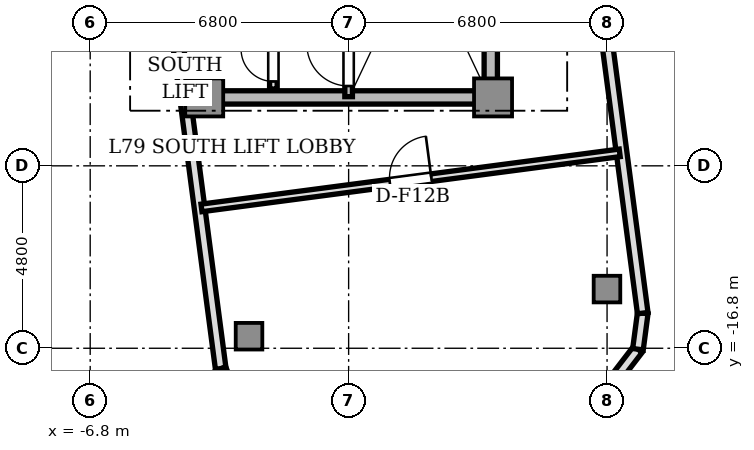
"""IFC4 building model, lengths in metres.
Left out: names, types, materials, properties, quantities, classifications, styles, units other than length and angle.
Written with IfcOpenShell. Run it as: python <this file> out.ifc"""

import sys

from ifc_helpers import new_model, si_unit, direction, frame, frame_2d, origin, origin_2d, place, context, subcontext, project, spatial, rectangle, extrude, source, transform, mapped, element, fill, save


model = new_model("IFC4")
c1 = context("Model", 3, precision=1e-05, world=origin(), true_north=direction((0.0, 1.0)))
c2 = subcontext(c1, "Body", "Model", "MODEL_VIEW")
j1 = project(units=[si_unit("LENGTHUNIT", "METRE"), si_unit("PLANEANGLEUNIT", "RADIAN")], contexts=[c1])
p1 = place(None, origin())
s1 = spatial("IfcSite", under=j1, at=p1, CompositionType="ELEMENT")
p2 = place(p1, origin())
s2 = spatial("IfcBuilding", under=s1, at=p2, CompositionType="ELEMENT")
p3 = place(p2, frame((0.0, 0.0, 285.1)))
s3 = spatial("IfcBuildingStorey", under=s2, at=p3, CompositionType="ELEMENT", Elevation=285.1)
p4 = place(p3, frame((-3.55, -10.2, 0.0), z_axis=(0.0, 0.0, 1.0), x_axis=(1.0, 0.0, 0.0)))
e1 = element("IfcWall", 1, at=p4, inside=s3, PredefinedType="SHEAR", context=c2, shape_type="SweptSolid", body=[
    extrude(rectangle(XDim=7.1, YDim=0.35, at=frame_2d((3.55, 0.0))), origin(), (0.0, 0.0, 1.0), 3.5),
])
p5 = place(p3, frame((3.74, -9.75, 0.0), z_axis=(0.0, 0.0, 1.0), x_axis=(0.0, 1.0, 0.0)))
e2 = element("IfcWall", 2, at=p5, inside=s3, PredefinedType="SHEAR", context=c2, shape_type="SweptSolid", body=[
    extrude(rectangle(XDim=6.9, YDim=0.35, at=frame_2d((3.45, 0.0))), origin(), (0.0, 0.0, 1.0), 3.5),
])
m1 = source(origin(), c2, "Body", "SweptSolid", [
    extrude(rectangle(XDim=1.0, YDim=1.0, at=origin_2d()), origin(), (0.0, 0.0, 1.0), 3.5),
])
for number, where, z_axis, x_axis in (
    (3, (-3.8, -10.2, 0.0), (0.0, 0.0, 1.0), (1.0, 0.0, 0.0)),
    (4, (3.8, -10.2, 0.0), (0.0, 0.0, 1.0), (1.0, 0.0, 0.0)),
):
    element("IfcColumn", number, at=place(p3, frame(where, z_axis=z_axis, x_axis=x_axis)), inside=s3, PredefinedType="COLUMN", context=c2, shape_type="MappedRepresentation", body=[
        mapped(m1, transform((0.0, 0.0, 0.0), scale=1.0)),
    ])
m2 = source(origin(), c2, "Body", "SweptSolid", [
    extrude(rectangle(XDim=0.7, YDim=0.7, at=origin_2d()), origin(), (0.0, 0.0, 1.0), 3.5),
])
for number, where, z_axis, x_axis in (
    (5, (-2.621, -16.483, 0.0), (0.0, 0.0, 1.0), (1.0, 0.0, 0.0)),
    (6, (6.798, -15.243, 0.0), (0.0, 0.0, 1.0), (1.0, 0.0, 0.0)),
):
    element("IfcColumn", number, at=place(p3, frame(where, z_axis=z_axis, x_axis=x_axis)), inside=s3, PredefinedType="COLUMN", context=c2, shape_type="MappedRepresentation", body=[
        mapped(m2, transform((0.0, 0.0, 0.0), scale=1.0)),
    ])
p6 = place(p3, frame((-4.821, -6.283, 0.0), z_axis=(0.0, 0.0, 1.0), x_axis=(0.130521347626, -0.991445499165, 0.0)))
e7 = element("IfcWall", 7, at=p6, inside=s3, PredefinedType="SOLIDWALL", context=c2, shape_type="SweptSolid", body=[
    extrude(rectangle(XDim=11.15, YDim=0.28, at=frame_2d((5.575, 0.0))), origin(), (0.0, 0.0, 1.0), 3.5),
])
p7 = place(p3, frame((-3.366, -17.338, 0.0), z_axis=(0.0, 0.0, 1.0), x_axis=(0.382659506909, -0.923889442397, 0.0)))
e8 = element("IfcWall", 8, at=p7, inside=s3, PredefinedType="SOLIDWALL", context=c2, shape_type="SweptSolid", body=[
    extrude(rectangle(XDim=0.958, YDim=0.28, at=frame_2d((0.479, 0.0))), origin(), (0.0, 0.0, 1.0), 3.5),
])
p8 = place(p3, frame((7.031, -17.585, 0.0), z_axis=(0.0, 0.0, 1.0), x_axis=(0.60861352168, 0.793466811674, 0.0)))
e9 = element("IfcWall", 9, at=p8, inside=s3, PredefinedType="SOLIDWALL", context=c2, shape_type="SweptSolid", body=[
    extrude(rectangle(XDim=0.958, YDim=0.28, at=frame_2d((0.479, 0.0))), origin(), (0.0, 0.0, 1.0), 3.5),
])
p9 = place(p3, frame((7.613, -16.825, 0.0), z_axis=(0.0, 0.0, 1.0), x_axis=(0.130527053476, 0.991444747987, 0.0)))
e10 = element("IfcWall", 10, at=p9, inside=s3, PredefinedType="SOLIDWALL", context=c2, shape_type="SweptSolid", body=[
    extrude(rectangle(XDim=0.958, YDim=0.28, at=frame_2d((0.479, 0.0))), origin(), (0.0, 0.0, 1.0), 3.5),
])
p10 = place(p3, frame((7.738, -15.876, 0.0), z_axis=(0.0, 0.0, 1.0), x_axis=(-0.130521347626, 0.991445499165, 0.0)))
e11 = element("IfcWall", 11, at=p10, inside=s3, PredefinedType="SOLIDWALL", context=c2, shape_type="SweptSolid", body=[
    extrude(rectangle(XDim=11.15, YDim=0.28, at=frame_2d((5.575, 0.0))), origin(), (0.0, 0.0, 1.0), 3.5),
])
p11 = place(p3, frame((0.0, -10.18, 0.0), z_axis=(0.0, 0.0, 1.0), x_axis=(0.0, 1.0, 0.0)))
e12 = element("IfcWall", 12, at=p11, inside=s3, PredefinedType="SOLIDWALL", context=c2, shape_type="SweptSolid", body=[
    extrude(rectangle(XDim=7.68, YDim=0.2, at=frame_2d((3.84, 0.0))), origin(), (0.0, 0.0, 1.0), 3.5),
])
p12 = place(p11, frame((0.28, 0.0, 0.0)))
e13 = element("IfcOpeningElement", 13, at=p12, cuts=e12, PredefinedType="OPENING", context=c2, shape_type="SweptSolid", body=[
    extrude(rectangle(XDim=1.1, YDim=2.15, at=frame_2d((0.55, 1.075))), frame((0.0, 0.11, 0.0), z_axis=(0.0, -1.0, 0.0), x_axis=(1.0, 0.0, 0.0)), (0.0, 0.0, 1.0), 0.22),
])
p13 = place(p3, frame((-1.98, -9.98, 0.0), z_axis=(0.0, 0.0, 1.0), x_axis=(0.0, 1.0, 0.0)))
e14 = element("IfcWall", 14, at=p13, inside=s3, PredefinedType="SOLIDWALL", context=c2, shape_type="SweptSolid", body=[
    extrude(rectangle(XDim=4.66, YDim=0.2, at=frame_2d((2.33, 0.0))), origin(), (0.0, 0.0, 1.0), 3.05),
])
p14 = place(p13, frame((0.2, 0.0, 0.0)))
e15 = element("IfcOpeningElement", 15, at=p14, cuts=e14, PredefinedType="OPENING", context=c2, shape_type="SweptSolid", body=[
    extrude(rectangle(XDim=0.85, YDim=2.1, at=frame_2d((0.425, 1.05))), frame((0.0, 0.11, 0.0), z_axis=(0.0, -1.0, 0.0), x_axis=(1.0, 0.0, 0.0)), (0.0, 0.0, 1.0), 0.22),
])
p15 = place(p3, frame((-3.872, -13.108, 0.0), z_axis=(0.0, 0.0, 1.0), x_axis=(0.991443437127, 0.130537009991, 0.0)))
e16 = element("IfcWall", 16, at=p15, inside=s3, PredefinedType="SOLIDWALL", context=c2, shape_type="SweptSolid", body=[
    extrude(rectangle(XDim=11.1, YDim=0.2, at=frame_2d((5.55, 0.0))), origin(), (0.0, 0.0, 1.0), 3.05),
])
p16 = place(p15, frame((5.0, 0.0, 0.0)))
e17 = element("IfcOpeningElement", 17, at=p16, cuts=e16, PredefinedType="OPENING", context=c2, shape_type="SweptSolid", body=[
    extrude(rectangle(XDim=1.1, YDim=2.15, at=frame_2d((0.55, 1.075))), frame((0.0, 0.11, 0.0), z_axis=(0.0, -1.0, 0.0), x_axis=(1.0, 0.0, 0.0)), (0.0, 0.0, 1.0), 0.22),
])
m3 = source(origin(), c2, "Body", "SweptSolid", [
    extrude(rectangle(XDim=1.1, YDim=0.05, at=origin_2d()), origin(), (0.0, 0.0, 1.0), 2.15),
])
p17 = place(p12, frame((0.55, 0.0, 0.0)))
e18 = element("IfcDoor", 18, at=p17, inside=s3, OperationType="SINGLE_SWING_RIGHT", PredefinedType="DOOR", context=c2, shape_type="MappedRepresentation", body=[
    mapped(m3, transform((0.0, 0.0, 0.0), scale=1.0)),
])
fill(e13, e18)
m4 = source(origin(), c2, "Body", "SweptSolid", [
    extrude(rectangle(XDim=0.85, YDim=0.05, at=origin_2d()), origin(), (0.0, 0.0, 1.0), 2.1),
])
p18 = place(p14, frame((0.425, 0.0, 0.0)))
e19 = element("IfcDoor", 19, at=p18, inside=s3, OperationType="SINGLE_SWING_RIGHT", PredefinedType="DOOR", context=c2, shape_type="MappedRepresentation", body=[
    mapped(m4, transform((0.0, 0.0, 0.0), scale=1.0)),
])
fill(e15, e19)
p19 = place(p16, frame((0.55, 0.0, 0.0)))
e20 = element("IfcDoor", 20, at=p19, inside=s3, OperationType="SINGLE_SWING_RIGHT", PredefinedType="DOOR", context=c2, shape_type="MappedRepresentation", body=[
    mapped(m3, transform((0.0, 0.0, 0.0), scale=1.0)),
])
fill(e17, e20)
save(model, sys.argv[1])
